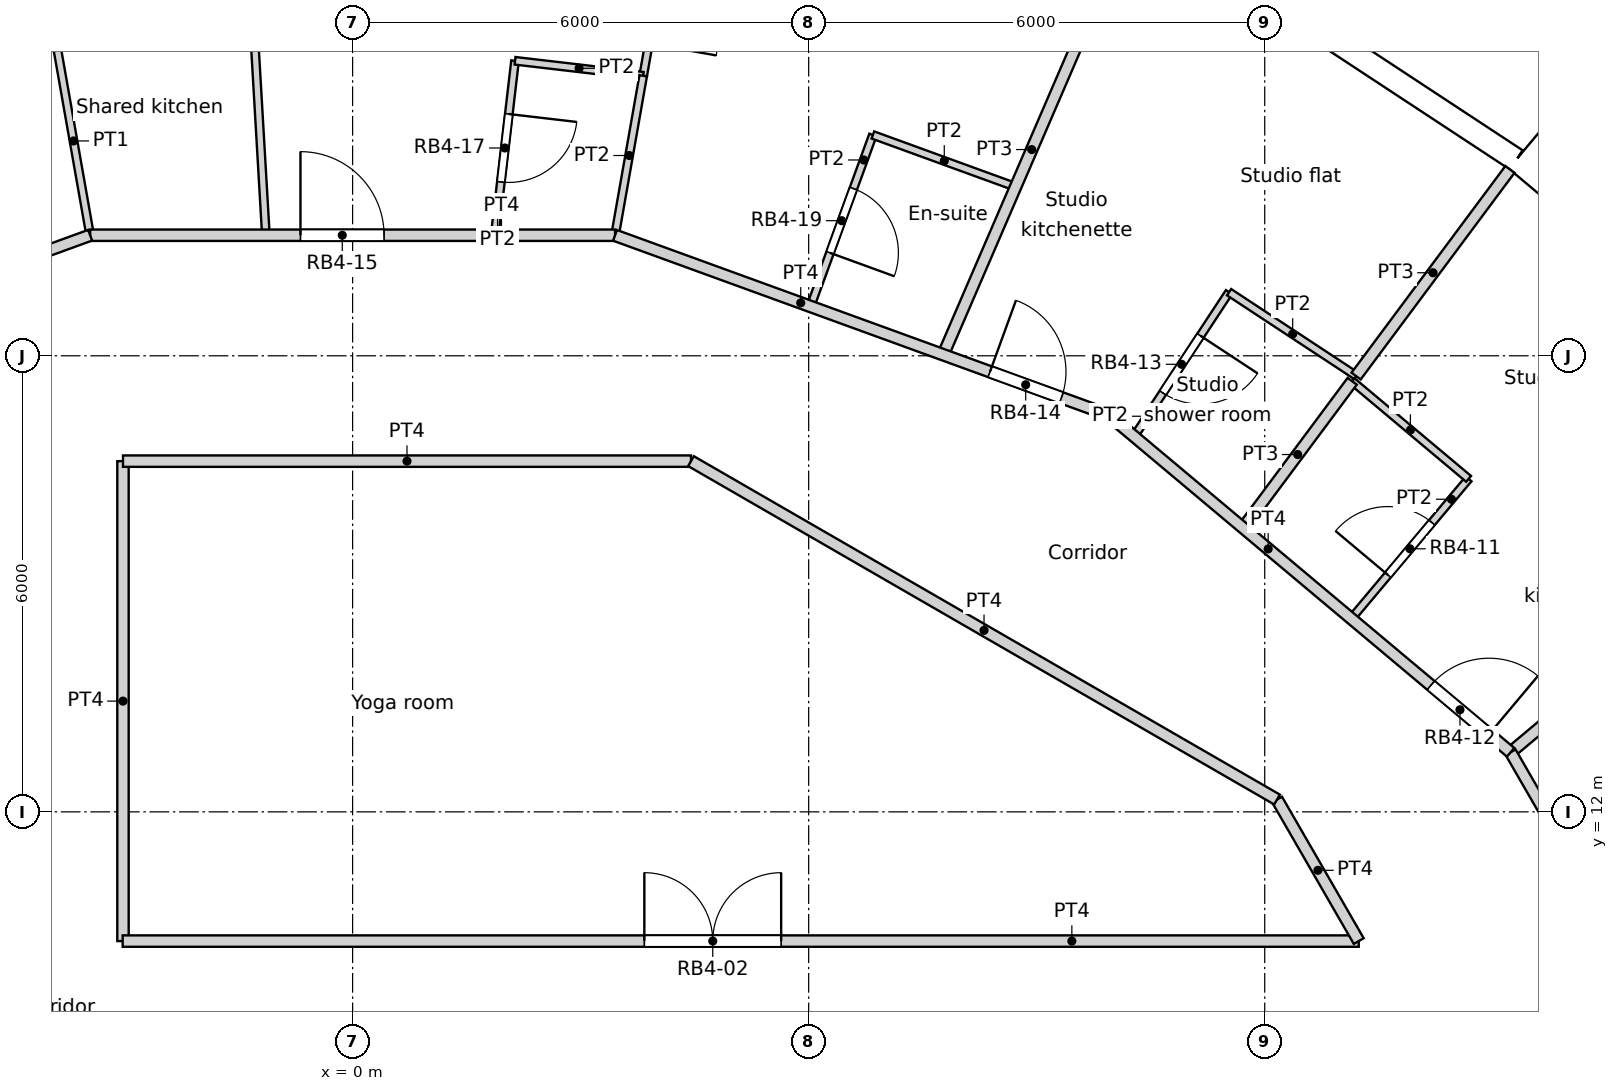
"""IFC4 building model, lengths in metres.
Left out: names, types, materials, properties, quantities, classifications, styles, units other than length and angle.
Written with IfcOpenShell. Run it as: python <this file> out.ifc"""

import sys

from ifc_helpers import new_model, si_unit, direction, frame, frame_2d, origin, origin_2d, place, context, subcontext, project, spatial, rectangle, circle, extrude, element, fill, save


model = new_model("IFC4")
c1 = context("Model", 3, precision=1e-05, world=origin(), true_north=direction((0.0, 1.0)))
c2 = subcontext(c1, "Body", "Model", "MODEL_VIEW")
j1 = project(units=[si_unit("LENGTHUNIT", "METRE"), si_unit("PLANEANGLEUNIT", "RADIAN")], contexts=[c1])
p1 = place(None, origin())
s1 = spatial("IfcSite", under=j1, at=p1, CompositionType="ELEMENT")
p2 = place(p1, origin())
s2 = spatial("IfcBuilding", under=s1, at=p2, CompositionType="ELEMENT")
p3 = place(p2, frame((0.0, 0.0, 158.4)))
s3 = spatial("IfcBuildingStorey", under=s2, at=p3, CompositionType="ELEMENT", Elevation=158.4)
for number, where, z_axis, x_axis in (
    (1, (14.659, 19.69, 0.0), (0.0, 0.0, 1.0), (1.0, 0.0, 0.0)),
    (2, (9.723, 22.54, 0.0), (0.0, 0.0, 1.0), (1.0, 0.0, 0.0)),
):
    element("IfcColumn", number, at=place(p3, frame(where, z_axis=z_axis, x_axis=x_axis)), inside=s3, PredefinedType="COLUMN", context=c2, shape_type="SweptSolid", body=[
        extrude(circle(Radius=0.6, at=origin_2d()), origin(), (0.0, 0.0, 1.0), 3.6),
    ])
for number, where, z_axis, x_axis in (
    (3, (15.552, 10.603, 0.0), (0.0, 0.0, 1.0), (1.0, 0.0, 0.0)),
    (4, (11.735, 14.716, 0.0), (0.0, 0.0, 1.0), (1.0, 0.0, 0.0)),
    (5, (6.876, 17.521, 0.0), (0.0, 0.0, 1.0), (1.0, 0.0, 0.0)),
    (6, (1.406, 18.77, 0.0), (0.0, 0.0, 1.0), (1.0, 0.0, 0.0)),
    (7, (-4.188, 18.35, 0.0), (0.0, 0.0, 1.0), (1.0, 0.0, 0.0)),
):
    element("IfcColumn", number, at=place(p3, frame(where, z_axis=z_axis, x_axis=x_axis)), inside=s3, PredefinedType="COLUMN", context=c2, shape_type="SweptSolid", body=[
        extrude(circle(Radius=0.65, at=origin_2d()), origin(), (0.0, 0.0, 1.0), 3.6),
    ])
p4 = place(p3, frame((17.977, 19.09, -0.3), z_axis=(0.0, 0.0, 1.0), x_axis=(-0.766022196139, 0.642814121673, 0.0)))
e8 = element("IfcWall", 8, at=p4, inside=s3, PredefinedType="ELEMENTEDWALL", context=c2, shape_type="SweptSolid", body=[
    extrude(rectangle(XDim=3.0, YDim=1.45, at=frame_2d((1.5, 0.0))), origin(), (0.0, 0.0, 1.0), 3.6),
])
p5 = place(p4, frame((1.5, 0.0, 1.85)))
e9 = element("IfcOpeningElement", 9, at=p5, cuts=e8, PredefinedType="OPENING", context=c2, shape_type="SweptSolid", body=[
    extrude(circle(Radius=0.9, at=origin_2d()), frame((0.0, 0.735, 0.0), z_axis=(0.0, -1.0, 0.0), x_axis=(1.0, 0.0, 0.0)), (0.0, 0.0, 1.0), 1.47),
])
p6 = place(p3, frame((15.308, 20.578, 0.0), z_axis=(0.0, 0.0, 1.0), x_axis=(-0.835470659512, 0.549535055382, 0.0)))
e10 = element("IfcWall", 10, at=p6, inside=s3, PredefinedType="SOLIDWALL", context=c2, shape_type="SweptSolid", body=[
    extrude(rectangle(XDim=2.973, YDim=0.3, at=frame_2d((1.487, 0.0))), origin(), (0.0, 0.0, 1.0), 3.3),
])
p7 = place(p6, frame((1.486, 0.0, 1.55)))
e11 = element("IfcOpeningElement", 11, at=p7, cuts=e10, PredefinedType="OPENING", context=c2, shape_type="SweptSolid", body=[
    extrude(circle(Radius=0.9, at=origin_2d()), frame((0.0, 0.16, 0.0), z_axis=(0.0, -1.0, 0.0), x_axis=(1.0, 0.0, 0.0)), (0.0, 0.0, 1.0), 0.32),
])
p8 = place(p3, frame((-3.025, 10.3, 0.0), z_axis=(0.0, 0.0, 1.0), x_axis=(1.0, 0.0, 0.0)))
e12 = element("IfcWall", 12, at=p8, inside=s3, PredefinedType="PARTITIONING", context=c2, shape_type="SweptSolid", body=[
    extrude(rectangle(XDim=16.262, YDim=0.15, at=frame_2d((8.131, 0.0))), origin(), (0.0, 0.0, 1.0), 3.3),
])
p9 = place(p8, frame((6.863, 0.0, 0.0)))
e13 = element("IfcOpeningElement", 13, at=p9, cuts=e12, PredefinedType="OPENING", context=c2, shape_type="SweptSolid", body=[
    extrude(rectangle(XDim=1.8, YDim=2.1, at=frame_2d((0.9, 1.05))), frame((0.0, 0.075, 0.0), z_axis=(0.0, -1.0, 0.0), x_axis=(1.0, 0.0, 0.0)), (0.0, 0.0, 1.0), 0.15),
])
p10 = place(p3, frame((12.162, 12.162, 0.0), z_axis=(0.0, 0.0, 1.0), x_axis=(0.499961633463, -0.866047553582, 0.0)))
e14 = element("IfcWall", 14, at=p10, inside=s3, PredefinedType="PARTITIONING", context=c2, shape_type="SweptSolid", body=[
    extrude(rectangle(XDim=2.15, YDim=0.15, at=frame_2d((1.075, 0.0))), origin(), (0.0, 0.0, 1.0), 3.3),
])
p11 = place(p3, frame((15.235, 12.784, 0.0), z_axis=(0.0, 0.0, 1.0), x_axis=(0.499940714931, -0.86605962933, 0.0)))
e15 = element("IfcWall", 15, at=p11, inside=s3, PredefinedType="PARTITIONING", context=c2, shape_type="SweptSolid", body=[
    extrude(rectangle(XDim=6.907, YDim=0.15, at=frame_2d((3.454, 0.0))), origin(), (0.0, 0.0, 1.0), 3.3),
])
p12 = place(p11, frame((5.249, 0.0, 0.0)))
e16 = element("IfcOpeningElement", 16, at=p12, cuts=e15, PredefinedType="OPENING", context=c2, shape_type="SweptSolid", body=[
    extrude(rectangle(XDim=1.0, YDim=2.1, at=frame_2d((0.5, 1.05))), frame((0.0, 0.075, 0.0), z_axis=(0.0, -1.0, 0.0), x_axis=(1.0, 0.0, 0.0)), (0.0, 0.0, 1.0), 0.15),
])
p13 = place(p11, frame((3.041, 0.0, 0.0)))
e17 = element("IfcOpeningElement", 17, at=p13, cuts=e15, PredefinedType="OPENING", context=c2, shape_type="SweptSolid", body=[
    extrude(rectangle(XDim=1.0, YDim=2.1, at=frame_2d((0.5, 1.05))), frame((0.0, 0.075, 0.0), z_axis=(0.0, -1.0, 0.0), x_axis=(1.0, 0.0, 0.0)), (0.0, 0.0, 1.0), 0.15),
])
p14 = place(p3, frame((9.943, 17.222, 0.0), z_axis=(0.0, 0.0, 1.0), x_axis=(0.766192104565, -0.642611592567, 0.0)))
e18 = element("IfcWall", 18, at=p14, inside=s3, PredefinedType="PARTITIONING", context=c2, shape_type="SweptSolid", body=[
    extrude(rectangle(XDim=6.906, YDim=0.15, at=frame_2d((3.453, 0.0))), origin(), (0.0, 0.0, 1.0), 3.3),
])
p15 = place(p14, frame((5.537, 0.0, 0.0)))
e19 = element("IfcOpeningElement", 19, at=p15, cuts=e18, PredefinedType="OPENING", context=c2, shape_type="SweptSolid", body=[
    extrude(rectangle(XDim=1.0, YDim=2.1, at=frame_2d((0.5, 1.05))), frame((0.0, 0.075, 0.0), z_axis=(0.0, -1.0, 0.0), x_axis=(1.0, 0.0, 0.0)), (0.0, 0.0, 1.0), 0.15),
])
p16 = place(p3, frame((4.452, 16.614, 0.0), z_axis=(0.0, 0.0, 1.0), x_axis=(0.866005203721, -0.500034985904, 0.0)))
e20 = element("IfcWall", 20, at=p16, inside=s3, PredefinedType="PARTITIONING", context=c2, shape_type="SweptSolid", body=[
    extrude(rectangle(XDim=8.903, YDim=0.15, at=frame_2d((4.452, 0.0))), origin(), (0.0, 0.0, 1.0), 3.3),
])
p17 = place(p3, frame((-3.021, 16.614, 0.0), z_axis=(0.0, 0.0, 1.0), x_axis=(1.0, 0.0, 0.0)))
e21 = element("IfcWall", 21, at=p17, inside=s3, PredefinedType="PARTITIONING", context=c2, shape_type="SweptSolid", body=[
    extrude(rectangle(XDim=7.473, YDim=0.15, at=frame_2d((3.736, 0.0))), origin(), (0.0, 0.0, 1.0), 3.3),
])
p18 = place(p3, frame((-3.021, 10.3, 0.0), z_axis=(0.0, 0.0, 1.0), x_axis=(0.0, 1.0, 0.0)))
e22 = element("IfcWall", 22, at=p18, inside=s3, PredefinedType="PARTITIONING", context=c2, shape_type="SweptSolid", body=[
    extrude(rectangle(XDim=6.314, YDim=0.15, at=frame_2d((3.157, 0.0))), origin(), (0.0, 0.0, 1.0), 3.3),
])
p19 = place(p3, frame((3.452, 19.585, 0.0), z_axis=(0.0, 0.0, 1.0), x_axis=(0.939737689664, -0.341896292208, 0.0)))
e23 = element("IfcWall", 23, at=p19, inside=s3, PredefinedType="PARTITIONING", context=c2, shape_type="SweptSolid", body=[
    extrude(rectangle(XDim=6.908, YDim=0.15, at=frame_2d((3.454, 0.0))), origin(), (0.0, 0.0, 1.0), 3.3),
])
p20 = place(p19, frame((5.249, 0.0, 0.0)))
e24 = element("IfcOpeningElement", 24, at=p20, cuts=e23, PredefinedType="OPENING", context=c2, shape_type="SweptSolid", body=[
    extrude(rectangle(XDim=1.0, YDim=2.1, at=frame_2d((0.5, 1.05))), frame((0.0, 0.075, 0.0), z_axis=(0.0, -1.0, 0.0), x_axis=(1.0, 0.0, 0.0)), (0.0, 0.0, 1.0), 0.15),
])
p21 = place(p3, frame((-3.453, 19.586, 0.0), z_axis=(0.0, 0.0, 1.0), x_axis=(1.0, 0.0, 0.0)))
e25 = element("IfcWall", 25, at=p21, inside=s3, PredefinedType="PARTITIONING", context=c2, shape_type="SweptSolid", body=[
    extrude(rectangle(XDim=6.906, YDim=0.15, at=frame_2d((3.453, 0.0))), origin(), (0.0, 0.0, 1.0), 3.3),
])
p22 = place(p21, frame((2.767, 0.0, 0.0)))
e26 = element("IfcOpeningElement", 26, at=p22, cuts=e25, PredefinedType="OPENING", context=c2, shape_type="SweptSolid", body=[
    extrude(rectangle(XDim=1.1, YDim=2.1, at=frame_2d((0.55, 1.05))), frame((0.0, 0.075, 0.0), z_axis=(0.0, -1.0, 0.0), x_axis=(1.0, 0.0, 0.0)), (0.0, 0.0, 1.0), 0.15),
])
p23 = place(p3, frame((-9.944, 17.224, 0.0), z_axis=(0.0, 0.0, 1.0), x_axis=(0.939722202107, 0.341938858377, 0.0)))
e27 = element("IfcWall", 27, at=p23, inside=s3, PredefinedType="PARTITIONING", context=c2, shape_type="SweptSolid", body=[
    extrude(rectangle(XDim=6.908, YDim=0.15, at=frame_2d((3.454, 0.0))), origin(), (0.0, 0.0, 1.0), 3.3),
])
p24 = place(p3, frame((15.235, 12.784, 0.0), z_axis=(0.0, 0.0, 1.0), x_axis=(0.766069165353, 0.642758145725, 0.0)))
e28 = element("IfcWall", 28, at=p24, inside=s3, PredefinedType="PARTITIONING", context=c2, shape_type="SweptSolid", body=[
    extrude(rectangle(XDim=5.609, YDim=0.15, at=frame_2d((2.804, 0.0))), origin(), (0.0, 0.0, 1.0), 3.3),
])
p25 = place(p3, frame((13.139, 14.542, 0.0), z_axis=(0.0, 0.0, 1.0), x_axis=(0.642731657745, 0.766091388891, 0.0)))
e29 = element("IfcWall", 29, at=p25, inside=s3, PredefinedType="PARTITIONING", context=c2, shape_type="SweptSolid", body=[
    extrude(rectangle(XDim=2.401, YDim=0.1, at=frame_2d((1.2, 0.0))), origin(), (0.0, 0.0, 1.0), 3.3),
])
p26 = place(p25, frame((0.75, 0.0, 0.0)))
e30 = element("IfcOpeningElement", 30, at=p26, cuts=e29, PredefinedType="OPENING", context=c2, shape_type="SweptSolid", body=[
    extrude(rectangle(XDim=0.9, YDim=2.04, at=frame_2d((0.45, 1.02))), frame((0.0, 0.05, 0.0), z_axis=(0.0, -1.0, 0.0), x_axis=(1.0, 0.0, 0.0)), (0.0, 0.0, 1.0), 0.1),
])
p27 = place(p3, frame((13.151, 17.665, 0.0), z_axis=(0.0, 0.0, 1.0), x_axis=(0.766224532916, -0.642572925945, 0.0)))
e31 = element("IfcWall", 31, at=p27, inside=s3, PredefinedType="PARTITIONING", context=c2, shape_type="SweptSolid", body=[
    extrude(rectangle(XDim=1.998, YDim=0.1, at=frame_2d((0.999, 0.0))), origin(), (0.0, 0.0, 1.0), 3.3),
])
p28 = place(p3, frame((13.202, 17.733, 0.0), z_axis=(0.0, 0.0, 1.0), x_axis=(0.597149819296, 0.802129723495, 0.0)))
e32 = element("IfcWall", 32, at=p28, inside=s3, PredefinedType="PARTITIONING", context=c2, shape_type="SweptSolid", body=[
    extrude(rectangle(XDim=3.39, YDim=0.15, at=frame_2d((1.695, 0.0))), origin(), (0.0, 0.0, 1.0), 3.3),
])
p29 = place(p3, frame((11.716, 15.737, 0.0), z_axis=(0.0, 0.0, 1.0), x_axis=(0.597021412293, 0.802225300813, 0.0)))
e33 = element("IfcWall", 33, at=p29, inside=s3, PredefinedType="PARTITIONING", context=c2, shape_type="SweptSolid", body=[
    extrude(rectangle(XDim=2.403, YDim=0.15, at=frame_2d((1.202, 0.0))), origin(), (0.0, 0.0, 1.0), 3.3),
])
p30 = place(p3, frame((11.531, 18.837, 0.0), z_axis=(0.0, 0.0, 1.0), x_axis=(0.835392041163, -0.549654562032, 0.0)))
e34 = element("IfcWall", 34, at=p30, inside=s3, PredefinedType="PARTITIONING", context=c2, shape_type="SweptSolid", body=[
    extrude(rectangle(XDim=2.003, YDim=0.1, at=frame_2d((1.001, 0.0))), origin(), (0.0, 0.0, 1.0), 3.3),
])
p31 = place(p3, frame((10.282, 16.939, 0.0), z_axis=(0.0, 0.0, 1.0), x_axis=(0.549730960803, 0.83534176882, 0.0)))
e35 = element("IfcWall", 35, at=p31, inside=s3, PredefinedType="PARTITIONING", context=c2, shape_type="SweptSolid", body=[
    extrude(rectangle(XDim=2.272, YDim=0.1, at=frame_2d((1.136, 0.0))), origin(), (0.0, 0.0, 1.0), 3.3),
])
p32 = place(p31, frame((0.686, 0.0, 0.0)))
e36 = element("IfcOpeningElement", 36, at=p32, cuts=e35, PredefinedType="OPENING", context=c2, shape_type="SweptSolid", body=[
    extrude(rectangle(XDim=0.9, YDim=2.04, at=frame_2d((0.45, 1.02))), frame((0.0, 0.05, 0.0), z_axis=(0.0, -1.0, 0.0), x_axis=(1.0, 0.0, 0.0)), (0.0, 0.0, 1.0), 0.1),
])
p33 = place(p3, frame((7.77, 18.015, 0.0), z_axis=(0.0, 0.0, 1.0), x_axis=(0.396238716554, 0.918147526002, 0.0)))
e37 = element("IfcWall", 37, at=p33, inside=s3, PredefinedType="PARTITIONING", context=c2, shape_type="SweptSolid", body=[
    extrude(rectangle(XDim=5.879, YDim=0.15, at=frame_2d((2.939, 0.0))), origin(), (0.0, 0.0, 1.0), 3.3),
])
p34 = place(p3, frame((-1.483, 25.454, 0.0), z_axis=(0.0, 0.0, 1.0), x_axis=(0.058147412668, -0.998308007781, 0.0)))
e38 = element("IfcWall", 38, at=p34, inside=s3, PredefinedType="PARTITIONING", context=c2, shape_type="SweptSolid", body=[
    extrude(rectangle(XDim=5.878, YDim=0.1, at=frame_2d((2.939, 0.0))), origin(), (0.0, 0.0, 1.0), 3.3),
])
p35 = place(p34, frame((2.439, 0.0, 0.0)))
e39 = element("IfcOpeningElement", 39, at=p35, cuts=e38, PredefinedType="OPENING", context=c2, shape_type="SweptSolid", body=[
    extrude(rectangle(XDim=1.0, YDim=2.04, at=frame_2d((0.5, 1.02))), frame((0.0, 0.05, 0.0), z_axis=(0.0, -1.0, 0.0), x_axis=(1.0, 0.0, 0.0)), (0.0, 0.0, 1.0), 0.1),
])
p36 = place(p3, frame((2.137, 21.881, 0.0), z_axis=(0.0, 0.0, 1.0), x_axis=(0.993241601719, -0.11606515676, 0.0)))
e40 = element("IfcWall", 40, at=p36, inside=s3, PredefinedType="PARTITIONING", context=c2, shape_type="SweptSolid", body=[
    extrude(rectangle(XDim=1.698, YDim=0.1, at=frame_2d((0.849, 0.0))), origin(), (0.0, 0.0, 1.0), 3.3),
])
p37 = place(p3, frame((1.869, 19.586, 0.0), z_axis=(0.0, 0.0, 1.0), x_axis=(0.116007517533, 0.993248335451, 0.0)))
e41 = element("IfcWall", 41, at=p37, inside=s3, PredefinedType="PARTITIONING", context=c2, shape_type="SweptSolid", body=[
    extrude(rectangle(XDim=2.311, YDim=0.1, at=frame_2d((1.155, 0.0))), origin(), (0.0, 0.0, 1.0), 3.3),
])
p38 = place(p37, frame((0.706, 0.0, 0.0)))
e42 = element("IfcOpeningElement", 42, at=p38, cuts=e41, PredefinedType="OPENING", context=c2, shape_type="SweptSolid", body=[
    extrude(rectangle(XDim=0.9, YDim=2.0, at=frame_2d((0.45, 1.0))), frame((0.0, 0.05, 0.0), z_axis=(0.0, -1.0, 0.0), x_axis=(1.0, 0.0, 0.0)), (0.0, 0.0, 1.0), 0.1),
])
p39 = place(p3, frame((3.823, 21.684, 0.0), z_axis=(0.0, 0.0, 1.0), x_axis=(0.173893421059, 0.984764478499, 0.0)))
e43 = element("IfcWall", 43, at=p39, inside=s3, PredefinedType="PARTITIONING", context=c2, shape_type="SweptSolid", body=[
    extrude(rectangle(XDim=3.479, YDim=0.1, at=frame_2d((1.74, 0.0))), origin(), (0.0, 0.0, 1.0), 3.3),
])
p40 = place(p39, frame((0.431, 0.0, 0.0)))
e44 = element("IfcOpeningElement", 44, at=p40, cuts=e43, PredefinedType="OPENING", context=c2, shape_type="SweptSolid", body=[
    extrude(rectangle(XDim=0.9, YDim=2.1, at=frame_2d((0.45, 1.05))), frame((0.0, 0.05, 0.0), z_axis=(0.0, -1.0, 0.0), x_axis=(1.0, 0.0, 0.0)), (0.0, 0.0, 1.0), 0.1),
])
p41 = place(p3, frame((-4.428, 25.11, 0.0), z_axis=(0.0, 0.0, 1.0), x_axis=(0.17382754149, -0.984776109489, 0.0)))
e45 = element("IfcWall", 45, at=p41, inside=s3, PredefinedType="PARTITIONING", context=c2, shape_type="SweptSolid", body=[
    extrude(rectangle(XDim=5.61, YDim=0.1, at=frame_2d((2.805, 0.0))), origin(), (0.0, 0.0, 1.0), 3.3),
])
p42 = place(p41, frame((2.139, 0.0, 0.0)))
e46 = element("IfcOpeningElement", 46, at=p42, cuts=e45, PredefinedType="OPENING", context=c2, shape_type="SweptSolid", body=[
    extrude(rectangle(XDim=0.9, YDim=2.1, at=frame_2d((0.45, 1.05))), frame((0.0, 0.05, 0.0), z_axis=(0.0, -1.0, 0.0), x_axis=(1.0, 0.0, 0.0)), (0.0, 0.0, 1.0), 0.1),
])
p43 = place(p3, frame((3.453, 19.586, 0.0), z_axis=(0.0, 0.0, 1.0), x_axis=(0.173719962819, 0.984795092655, 0.0)))
e47 = element("IfcWall", 47, at=p43, inside=s3, PredefinedType="PARTITIONING", context=c2, shape_type="SweptSolid", body=[
    extrude(rectangle(XDim=2.131, YDim=0.1, at=frame_2d((1.065, 0.0))), origin(), (0.0, 0.0, 1.0), 3.3),
])
p44 = place(p3, frame((6.845, 20.905, 0.0), z_axis=(0.0, 0.0, 1.0), x_axis=(0.939757747305, -0.341841156651, 0.0)))
e48 = element("IfcWall", 48, at=p44, inside=s3, PredefinedType="PARTITIONING", context=c2, shape_type="SweptSolid", body=[
    extrude(rectangle(XDim=1.998, YDim=0.1, at=frame_2d((0.999, 0.0))), origin(), (0.0, 0.0, 1.0), 3.3),
])
p45 = place(p3, frame((6.024, 18.65, 0.0), z_axis=(0.0, 0.0, 1.0), x_axis=(0.342110593602, 0.939659694648, 0.0)))
e49 = element("IfcWall", 49, at=p45, inside=s3, PredefinedType="PARTITIONING", context=c2, shape_type="SweptSolid", body=[
    extrude(rectangle(XDim=2.4, YDim=0.1, at=frame_2d((1.2, 0.0))), origin(), (0.0, 0.0, 1.0), 3.3),
])
p46 = place(p45, frame((0.75, 0.0, 0.0)))
e50 = element("IfcOpeningElement", 50, at=p46, cuts=e49, PredefinedType="OPENING", context=c2, shape_type="SweptSolid", body=[
    extrude(rectangle(XDim=0.9, YDim=2.04, at=frame_2d((0.45, 1.02))), frame((0.0, 0.05, 0.0), z_axis=(0.0, -1.0, 0.0), x_axis=(1.0, 0.0, 0.0)), (0.0, 0.0, 1.0), 0.1),
])
p47 = place(p7, origin())
e51 = element("IfcWindow", 51, at=p47, inside=s3, PartitioningType="SINGLE_PANEL", PredefinedType="WINDOW", context=c2, shape_type="SweptSolid", body=[
    extrude(circle(Radius=0.9, at=origin_2d()), frame((0.0, 0.12, 0.0), z_axis=(0.0, -1.0, 0.0), x_axis=(1.0, 0.0, 0.0)), (0.0, 0.0, 1.0), 0.1),
])
fill(e11, e51)
p48 = place(p9, origin())
e52 = element("IfcDoor", 52, at=p48, inside=s3, OperationType="DOUBLE_DOOR_SINGLE_SWING", PredefinedType="DOOR", context=c2, shape_type="SweptSolid", body=[
    extrude(rectangle(XDim=1.8, YDim=2.1, at=frame_2d((0.9, 1.05))), frame((0.0, 0.025, 0.0), z_axis=(0.0, -1.0, 0.0), x_axis=(1.0, 0.0, 0.0)), (0.0, 0.0, 1.0), 0.05),
])
fill(e13, e52)
p49 = place(p26, origin())
e53 = element("IfcDoor", 53, at=p49, inside=s3, OperationType="SINGLE_SWING_LEFT", PredefinedType="DOOR", context=c2, shape_type="SweptSolid", body=[
    extrude(rectangle(XDim=0.9, YDim=2.04, at=frame_2d((0.45, 1.02))), frame((0.0, 0.025, 0.0), z_axis=(0.0, -1.0, 0.0), x_axis=(1.0, 0.0, 0.0)), (0.0, 0.0, 1.0), 0.05),
])
fill(e30, e53)
p50 = place(p15, origin())
e54 = element("IfcDoor", 54, at=p50, inside=s3, OperationType="SINGLE_SWING_RIGHT", PredefinedType="DOOR", context=c2, shape_type="SweptSolid", body=[
    extrude(rectangle(XDim=1.0, YDim=2.1, at=frame_2d((0.5, 1.05))), frame((0.0, 0.025, 0.0), z_axis=(0.0, -1.0, 0.0), x_axis=(1.0, 0.0, 0.0)), (0.0, 0.0, 1.0), 0.05),
])
fill(e19, e54)
p51 = place(p32, origin())
e55 = element("IfcDoor", 55, at=p51, inside=s3, OperationType="SINGLE_SWING_LEFT", PredefinedType="DOOR", context=c2, shape_type="SweptSolid", body=[
    extrude(rectangle(XDim=0.9, YDim=2.04, at=frame_2d((0.45, 1.02))), frame((0.0, 0.025, 0.0), z_axis=(0.0, -1.0, 0.0), x_axis=(1.0, 0.0, 0.0)), (0.0, 0.0, 1.0), 0.05),
])
fill(e36, e55)
p52 = place(p20, origin())
e56 = element("IfcDoor", 56, at=p52, inside=s3, OperationType="SINGLE_SWING_LEFT", PredefinedType="DOOR", context=c2, shape_type="SweptSolid", body=[
    extrude(rectangle(XDim=1.0, YDim=2.1, at=frame_2d((0.5, 1.05))), frame((0.0, 0.025, 0.0), z_axis=(0.0, -1.0, 0.0), x_axis=(1.0, 0.0, 0.0)), (0.0, 0.0, 1.0), 0.05),
])
fill(e24, e56)
p53 = place(p22, origin())
e57 = element("IfcDoor", 57, at=p53, inside=s3, OperationType="SINGLE_SWING_LEFT", PredefinedType="DOOR", context=c2, shape_type="SweptSolid", body=[
    extrude(rectangle(XDim=1.1, YDim=2.1, at=frame_2d((0.55, 1.05))), frame((0.0, 0.025, 0.0), z_axis=(0.0, -1.0, 0.0), x_axis=(1.0, 0.0, 0.0)), (0.0, 0.0, 1.0), 0.05),
])
fill(e26, e57)
p54 = place(p38, origin())
e58 = element("IfcDoor", 58, at=p54, inside=s3, OperationType="SINGLE_SWING_LEFT", PredefinedType="DOOR", context=c2, shape_type="SweptSolid", body=[
    extrude(rectangle(XDim=0.9, YDim=2.0, at=frame_2d((0.45, 1.0))), frame((0.0, 0.025, 0.0), z_axis=(0.0, -1.0, 0.0), x_axis=(1.0, 0.0, 0.0)), (0.0, 0.0, 1.0), 0.05),
])
fill(e42, e58)
p55 = place(p46, origin())
e59 = element("IfcDoor", 59, at=p55, inside=s3, OperationType="SINGLE_SWING_RIGHT", PredefinedType="DOOR", context=c2, shape_type="SweptSolid", body=[
    extrude(rectangle(XDim=0.9, YDim=2.04, at=frame_2d((0.45, 1.02))), frame((0.0, 0.025, 0.0), z_axis=(0.0, -1.0, 0.0), x_axis=(1.0, 0.0, 0.0)), (0.0, 0.0, 1.0), 0.05),
])
fill(e50, e59)
save(model, sys.argv[1])
